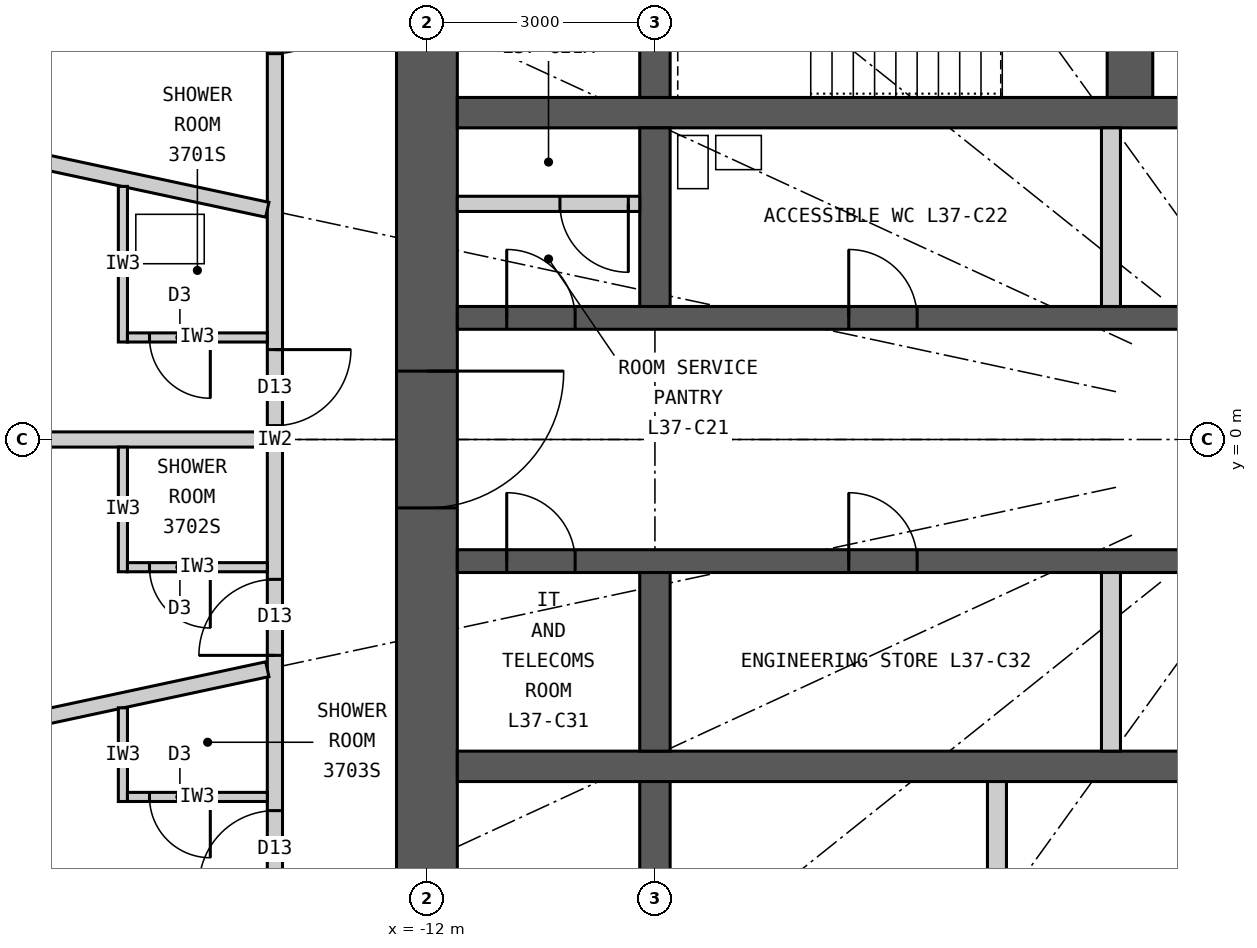
"""IFC4 building model, lengths in metres.
Left out: names, types, materials, properties, quantities, classifications, styles, units other than length and angle.
Written with IfcOpenShell. Run it as: python <this file> out.ifc"""

import sys

from ifc_helpers import new_model, si_unit, direction, frame, frame_2d, origin, place, context, subcontext, project, spatial, rectangle, extrude, element, fill, save


model = new_model("IFC4")
c1 = context("Model", 3, precision=1e-05, world=origin(), true_north=direction((0.0, 1.0)))
c2 = subcontext(c1, "Body", "Model", "MODEL_VIEW")
j1 = project(units=[si_unit("LENGTHUNIT", "METRE"), si_unit("PLANEANGLEUNIT", "RADIAN")], contexts=[c1])
p1 = place(None, origin())
s1 = spatial("IfcSite", under=j1, at=p1, CompositionType="ELEMENT")
p2 = place(p1, origin())
s2 = spatial("IfcBuilding", under=s1, at=p2, CompositionType="ELEMENT")
p3 = place(p2, frame((0.0, 0.0, 143.4)))
s3 = spatial("IfcBuildingStorey", under=s2, at=p3, CompositionType="ELEMENT", Elevation=143.4)
p4 = place(p3, frame((-12.0, 7.6, 0.0), z_axis=(0.0, 0.0, 1.0), x_axis=(0.0, -1.0, 0.0)))
e1 = element("IfcWall", 1, at=p4, inside=s3, PredefinedType="SHEAR", context=c2, shape_type="SweptSolid", body=[
    extrude(rectangle(XDim=15.2, YDim=0.8, at=frame_2d((7.6, 0.0))), origin(), (0.0, 0.0, 1.0), 3.3),
])
p5 = place(p4, frame((6.7, 0.0, 0.0)))
e2 = element("IfcOpeningElement", 2, at=p5, cuts=e1, PredefinedType="OPENING", context=c2, shape_type="SweptSolid", body=[
    extrude(rectangle(XDim=1.8, YDim=2.2, at=frame_2d((0.9, 1.1))), frame((0.0, 0.41, 0.0), z_axis=(0.0, -1.0, 0.0), x_axis=(1.0, 0.0, 0.0)), (0.0, 0.0, 1.0), 0.82),
])
p6 = place(p3, frame((-11.6, 4.3, 0.0), z_axis=(0.0, 0.0, 1.0), x_axis=(1.0, 0.0, 0.0)))
e3 = element("IfcWall", 3, at=p6, inside=s3, PredefinedType="SHEAR", context=c2, shape_type="SweptSolid", body=[
    extrude(rectangle(XDim=23.2, YDim=0.4, at=frame_2d((11.6, 0.0))), origin(), (0.0, 0.0, 1.0), 3.3),
])
p7 = place(p3, frame((-11.6, 1.6, 0.0), z_axis=(0.0, 0.0, 1.0), x_axis=(1.0, 0.0, 0.0)))
e4 = element("IfcWall", 4, at=p7, inside=s3, PredefinedType="SHEAR", context=c2, shape_type="SweptSolid", body=[
    extrude(rectangle(XDim=23.2, YDim=0.3, at=frame_2d((11.6, 0.0))), origin(), (0.0, 0.0, 1.0), 3.3),
])
p8 = place(p7, frame((9.55, 0.0, 0.0)))
e5 = element("IfcOpeningElement", 5, at=p8, cuts=e4, PredefinedType="OPENING", context=c2, shape_type="SweptSolid", body=[
    extrude(rectangle(XDim=1.1, YDim=2.2, at=frame_2d((0.55, 1.1))), frame((0.0, 0.16, 0.0), z_axis=(0.0, -1.0, 0.0), x_axis=(1.0, 0.0, 0.0)), (0.0, 0.0, 1.0), 0.32),
])
p9 = place(p7, frame((12.55, 0.0, 0.0)))
e6 = element("IfcOpeningElement", 6, at=p9, cuts=e4, PredefinedType="OPENING", context=c2, shape_type="SweptSolid", body=[
    extrude(rectangle(XDim=1.1, YDim=2.2, at=frame_2d((0.55, 1.1))), frame((0.0, 0.16, 0.0), z_axis=(0.0, -1.0, 0.0), x_axis=(1.0, 0.0, 0.0)), (0.0, 0.0, 1.0), 0.32),
])
p10 = place(p7, frame((0.65, 0.0, 0.0)))
e7 = element("IfcOpeningElement", 7, at=p10, cuts=e4, PredefinedType="OPENING", context=c2, shape_type="SweptSolid", body=[
    extrude(rectangle(XDim=0.9, YDim=2.2, at=frame_2d((0.45, 1.1))), frame((0.0, 0.16, 0.0), z_axis=(0.0, -1.0, 0.0), x_axis=(1.0, 0.0, 0.0)), (0.0, 0.0, 1.0), 0.32),
])
p11 = place(p7, frame((5.15, 0.0, 0.0)))
e8 = element("IfcOpeningElement", 8, at=p11, cuts=e4, PredefinedType="OPENING", context=c2, shape_type="SweptSolid", body=[
    extrude(rectangle(XDim=0.9, YDim=2.2, at=frame_2d((0.45, 1.1))), frame((0.0, 0.16, 0.0), z_axis=(0.0, -1.0, 0.0), x_axis=(1.0, 0.0, 0.0)), (0.0, 0.0, 1.0), 0.32),
])
p12 = place(p7, frame((21.65, 0.0, 0.0)))
e9 = element("IfcOpeningElement", 9, at=p12, cuts=e4, PredefinedType="OPENING", context=c2, shape_type="SweptSolid", body=[
    extrude(rectangle(XDim=0.9, YDim=2.2, at=frame_2d((0.45, 1.1))), frame((0.0, 0.16, 0.0), z_axis=(0.0, -1.0, 0.0), x_axis=(1.0, 0.0, 0.0)), (0.0, 0.0, 1.0), 0.32),
])
p13 = place(p3, frame((-11.6, -4.3, 0.0), z_axis=(0.0, 0.0, 1.0), x_axis=(1.0, 0.0, 0.0)))
e10 = element("IfcWall", 10, at=p13, inside=s3, PredefinedType="SHEAR", context=c2, shape_type="SweptSolid", body=[
    extrude(rectangle(XDim=23.2, YDim=0.4, at=frame_2d((11.6, 0.0))), origin(), (0.0, 0.0, 1.0), 3.3),
])
p14 = place(p3, frame((-11.6, -1.6, 0.0), z_axis=(0.0, 0.0, 1.0), x_axis=(1.0, 0.0, 0.0)))
e11 = element("IfcWall", 11, at=p14, inside=s3, PredefinedType="SHEAR", context=c2, shape_type="SweptSolid", body=[
    extrude(rectangle(XDim=23.2, YDim=0.3, at=frame_2d((11.6, 0.0))), origin(), (0.0, 0.0, 1.0), 3.3),
])
p15 = place(p14, frame((9.55, 0.0, 0.0)))
e12 = element("IfcOpeningElement", 12, at=p15, cuts=e11, PredefinedType="OPENING", context=c2, shape_type="SweptSolid", body=[
    extrude(rectangle(XDim=1.1, YDim=2.2, at=frame_2d((0.55, 1.1))), frame((0.0, 0.16, 0.0), z_axis=(0.0, -1.0, 0.0), x_axis=(1.0, 0.0, 0.0)), (0.0, 0.0, 1.0), 0.32),
])
p16 = place(p14, frame((15.3, 0.0, 0.0)))
e13 = element("IfcOpeningElement", 13, at=p16, cuts=e11, PredefinedType="OPENING", context=c2, shape_type="SweptSolid", body=[
    extrude(rectangle(XDim=1.6, YDim=2.4, at=frame_2d((0.8, 1.2))), frame((0.0, 0.16, 0.0), z_axis=(0.0, -1.0, 0.0), x_axis=(1.0, 0.0, 0.0)), (0.0, 0.0, 1.0), 0.32),
])
p17 = place(p14, frame((0.65, 0.0, 0.0)))
e14 = element("IfcOpeningElement", 14, at=p17, cuts=e11, PredefinedType="OPENING", context=c2, shape_type="SweptSolid", body=[
    extrude(rectangle(XDim=0.9, YDim=2.2, at=frame_2d((0.45, 1.1))), frame((0.0, 0.16, 0.0), z_axis=(0.0, -1.0, 0.0), x_axis=(1.0, 0.0, 0.0)), (0.0, 0.0, 1.0), 0.32),
])
p18 = place(p14, frame((5.15, 0.0, 0.0)))
e15 = element("IfcOpeningElement", 15, at=p18, cuts=e11, PredefinedType="OPENING", context=c2, shape_type="SweptSolid", body=[
    extrude(rectangle(XDim=0.9, YDim=2.2, at=frame_2d((0.45, 1.1))), frame((0.0, 0.16, 0.0), z_axis=(0.0, -1.0, 0.0), x_axis=(1.0, 0.0, 0.0)), (0.0, 0.0, 1.0), 0.32),
])
p19 = place(p14, frame((21.65, 0.0, 0.0)))
e16 = element("IfcOpeningElement", 16, at=p19, cuts=e11, PredefinedType="OPENING", context=c2, shape_type="SweptSolid", body=[
    extrude(rectangle(XDim=0.9, YDim=2.2, at=frame_2d((0.45, 1.1))), frame((0.0, 0.16, 0.0), z_axis=(0.0, -1.0, 0.0), x_axis=(1.0, 0.0, 0.0)), (0.0, 0.0, 1.0), 0.32),
])
p20 = place(p3, frame((-9.0, 4.5, 0.0), z_axis=(0.0, 0.0, 1.0), x_axis=(0.0, 1.0, 0.0)))
e17 = element("IfcWall", 17, at=p20, inside=s3, PredefinedType="SHEAR", context=c2, shape_type="SweptSolid", body=[
    extrude(rectangle(XDim=3.1, YDim=0.4, at=frame_2d((1.55, 0.0))), origin(), (0.0, 0.0, 1.0), 3.3),
])
for number, where, z_axis, x_axis in (
    (18, (-9.0, 1.75, 0.0), (0.0, 0.0, 1.0), (0.0, 1.0, 0.0)),
    (19, (-9.0, -4.1, 0.0), (0.0, 0.0, 1.0), (0.0, 1.0, 0.0)),
):
    element("IfcWall", number, at=place(p3, frame(where, z_axis=z_axis, x_axis=x_axis)), inside=s3, PredefinedType="SHEAR", context=c2, shape_type="SweptSolid", body=[
        extrude(rectangle(XDim=2.35, YDim=0.4, at=frame_2d((1.175, 0.0))), origin(), (0.0, 0.0, 1.0), 3.3),
    ])
p21 = place(p3, frame((-9.0, -7.6, 0.0), z_axis=(0.0, 0.0, 1.0), x_axis=(0.0, 1.0, 0.0)))
e20 = element("IfcWall", 20, at=p21, inside=s3, PredefinedType="SHEAR", context=c2, shape_type="SweptSolid", body=[
    extrude(rectangle(XDim=3.1, YDim=0.4, at=frame_2d((1.55, 0.0))), origin(), (0.0, 0.0, 1.0), 3.3),
])
p22 = place(p3, frame((-2.75, 4.5, 0.0), z_axis=(0.0, 0.0, 1.0), x_axis=(0.0, 1.0, 0.0)))
e21 = element("IfcWall", 21, at=p22, inside=s3, PredefinedType="SHEAR", context=c2, shape_type="SweptSolid", body=[
    extrude(rectangle(XDim=3.1, YDim=0.6, at=frame_2d((1.55, 0.0))), origin(), (0.0, 0.0, 1.0), 3.3),
])
p23 = place(p22, frame((0.925, 0.0, 0.0)))
e22 = element("IfcOpeningElement", 22, at=p23, cuts=e21, PredefinedType="OPENING", context=c2, shape_type="SweptSolid", body=[
    extrude(rectangle(XDim=1.1, YDim=2.2, at=frame_2d((0.55, 1.1))), frame((0.0, 0.31, 0.0), z_axis=(0.0, -1.0, 0.0), x_axis=(1.0, 0.0, 0.0)), (0.0, 0.0, 1.0), 0.62),
])
p24 = place(p3, frame((-4.5, -7.6, 0.0), z_axis=(0.0, 0.0, 1.0), x_axis=(0.0, 1.0, 0.0)))
e23 = element("IfcWall", 23, at=p24, inside=s3, PredefinedType="PARTITIONING", context=c2, shape_type="SweptSolid", body=[
    extrude(rectangle(XDim=3.1, YDim=0.25, at=frame_2d((1.55, 0.0))), origin(), (0.0, 0.0, 1.0), 3.3),
])
for number, where, z_axis, x_axis in (
    (24, (-3.0, 1.75, 0.0), (0.0, 0.0, 1.0), (0.0, 1.0, 0.0)),
    (25, (-3.0, -4.1, 0.0), (0.0, 0.0, 1.0), (0.0, 1.0, 0.0)),
):
    element("IfcWall", number, at=place(p3, frame(where, z_axis=z_axis, x_axis=x_axis)), inside=s3, PredefinedType="PARTITIONING", context=c2, shape_type="SweptSolid", body=[
        extrude(rectangle(XDim=2.35, YDim=0.25, at=frame_2d((1.175, 0.0))), origin(), (0.0, 0.0, 1.0), 3.3),
    ])
p25 = place(p3, frame((-14.0, 9.9, 0.0), z_axis=(0.0, 0.0, 1.0), x_axis=(0.0, -1.0, 0.0)))
e26 = element("IfcWall", 26, at=p25, inside=s3, PredefinedType="PARTITIONING", context=c2, shape_type="SweptSolid", body=[
    extrude(rectangle(XDim=19.8, YDim=0.2, at=frame_2d((9.9, 0.0))), origin(), (0.0, 0.0, 1.0), 3.12),
])
p26 = place(p25, frame((8.718, 0.0, 0.0)))
e27 = element("IfcOpeningElement", 27, at=p26, cuts=e26, PredefinedType="OPENING", context=c2, shape_type="SweptSolid", body=[
    extrude(rectangle(XDim=1.0, YDim=2.2, at=frame_2d((0.5, 1.1))), frame((0.0, 0.11, 0.0), z_axis=(0.0, -1.0, 0.0), x_axis=(1.0, 0.0, 0.0)), (0.0, 0.0, 1.0), 0.22),
])
p27 = place(p25, frame((11.74, 0.0, 0.0)))
e28 = element("IfcOpeningElement", 28, at=p27, cuts=e26, PredefinedType="OPENING", context=c2, shape_type="SweptSolid", body=[
    extrude(rectangle(XDim=1.0, YDim=2.2, at=frame_2d((0.5, 1.1))), frame((0.0, 0.11, 0.0), z_axis=(0.0, -1.0, 0.0), x_axis=(1.0, 0.0, 0.0)), (0.0, 0.0, 1.0), 0.22),
])
p28 = place(p25, frame((14.782, 0.0, 0.0)))
e29 = element("IfcOpeningElement", 29, at=p28, cuts=e26, PredefinedType="OPENING", context=c2, shape_type="SweptSolid", body=[
    extrude(rectangle(XDim=1.0, YDim=2.2, at=frame_2d((0.5, 1.1))), frame((0.0, 0.11, 0.0), z_axis=(0.0, -1.0, 0.0), x_axis=(1.0, 0.0, 0.0)), (0.0, 0.0, 1.0), 0.22),
])
p29 = place(p25, frame((17.707, 0.0, 0.0)))
e30 = element("IfcOpeningElement", 30, at=p29, cuts=e26, PredefinedType="OPENING", context=c2, shape_type="SweptSolid", body=[
    extrude(rectangle(XDim=1.0, YDim=2.2, at=frame_2d((0.5, 1.1))), frame((0.0, 0.11, 0.0), z_axis=(0.0, -1.0, 0.0), x_axis=(1.0, 0.0, 0.0)), (0.0, 0.0, 1.0), 0.22),
])
p30 = place(p25, frame((3.824, 0.0, 0.0)))
e31 = element("IfcOpeningElement", 31, at=p30, cuts=e26, PredefinedType="OPENING", context=c2, shape_type="SweptSolid", body=[
    extrude(rectangle(XDim=1.0, YDim=2.2, at=frame_2d((0.5, 1.1))), frame((0.0, 0.11, 0.0), z_axis=(0.0, -1.0, 0.0), x_axis=(1.0, 0.0, 0.0)), (0.0, 0.0, 1.0), 0.22),
])
p31 = place(p3, frame((-14.1, 3.022, 0.0), z_axis=(0.0, 0.0, 1.0), x_axis=(-0.977790639684, 0.209584028367, 0.0)))
e32 = element("IfcWall", 32, at=p31, inside=s3, PredefinedType="PARTITIONING", context=c2, shape_type="SweptSolid", body=[
    extrude(rectangle(XDim=6.98, YDim=0.2, at=frame_2d((3.49, 0.0))), origin(), (0.0, 0.0, 1.0), 2.27),
])
p32 = place(p3, frame((-14.1, 0.0, 0.0), z_axis=(0.0, 0.0, 1.0), x_axis=(-1.0, 0.0, 0.0)))
e33 = element("IfcWall", 33, at=p32, inside=s3, PredefinedType="PARTITIONING", context=c2, shape_type="SweptSolid", body=[
    extrude(rectangle(XDim=7.6, YDim=0.2, at=frame_2d((3.8, 0.0))), origin(), (0.0, 0.0, 1.0), 2.27),
])
p33 = place(p3, frame((-14.1, -3.022, 0.0), z_axis=(0.0, 0.0, 1.0), x_axis=(-0.977790639684, -0.209584028367, 0.0)))
e34 = element("IfcWall", 34, at=p33, inside=s3, PredefinedType="PARTITIONING", context=c2, shape_type="SweptSolid", body=[
    extrude(rectangle(XDim=6.98, YDim=0.2, at=frame_2d((3.49, 0.0))), origin(), (0.0, 0.0, 1.0), 2.27),
])
p34 = place(p3, frame((-16.0, 3.33, 0.0), z_axis=(0.0, 0.0, 1.0), x_axis=(0.0, -1.0, 0.0)))
e35 = element("IfcWall", 35, at=p34, inside=s3, PredefinedType="PARTITIONING", context=c2, shape_type="SweptSolid", body=[
    extrude(rectangle(XDim=2.047, YDim=0.12, at=frame_2d((1.024, 0.0))), origin(), (0.0, 0.0, 1.0), 3.12),
])
p35 = place(p3, frame((-14.1, 1.343, 0.0), z_axis=(0.0, 0.0, 1.0), x_axis=(-1.0, 0.0, 0.0)))
e36 = element("IfcWall", 36, at=p35, inside=s3, PredefinedType="PARTITIONING", context=c2, shape_type="SweptSolid", body=[
    extrude(rectangle(XDim=1.84, YDim=0.12, at=frame_2d((0.92, 0.0))), origin(), (0.0, 0.0, 1.0), 3.12),
])
p36 = place(p35, frame((0.75, 0.0, 0.0)))
e37 = element("IfcOpeningElement", 37, at=p36, cuts=e36, PredefinedType="OPENING", context=c2, shape_type="SweptSolid", body=[
    extrude(rectangle(XDim=0.8, YDim=2.1, at=frame_2d((0.4, 1.05))), frame((0.0, 0.07, 0.0), z_axis=(0.0, -1.0, 0.0), x_axis=(1.0, 0.0, 0.0)), (0.0, 0.0, 1.0), 0.14),
])
p37 = place(p3, frame((-16.0, -0.1, 0.0), z_axis=(0.0, 0.0, 1.0), x_axis=(0.0, -1.0, 0.0)))
e38 = element("IfcWall", 38, at=p37, inside=s3, PredefinedType="PARTITIONING", context=c2, shape_type="SweptSolid", body=[
    extrude(rectangle(XDim=1.64, YDim=0.12, at=frame_2d((0.82, 0.0))), origin(), (0.0, 0.0, 1.0), 3.12),
])
p38 = place(p3, frame((-14.1, -1.68, 0.0), z_axis=(0.0, 0.0, 1.0), x_axis=(-1.0, 0.0, 0.0)))
e39 = element("IfcWall", 39, at=p38, inside=s3, PredefinedType="PARTITIONING", context=c2, shape_type="SweptSolid", body=[
    extrude(rectangle(XDim=1.84, YDim=0.12, at=frame_2d((0.92, 0.0))), origin(), (0.0, 0.0, 1.0), 3.12),
])
p39 = place(p38, frame((0.75, 0.0, 0.0)))
e40 = element("IfcOpeningElement", 40, at=p39, cuts=e39, PredefinedType="OPENING", context=c2, shape_type="SweptSolid", body=[
    extrude(rectangle(XDim=0.8, YDim=2.1, at=frame_2d((0.4, 1.05))), frame((0.0, 0.07, 0.0), z_axis=(0.0, -1.0, 0.0), x_axis=(1.0, 0.0, 0.0)), (0.0, 0.0, 1.0), 0.14),
])
p40 = place(p3, frame((-16.0, -3.53, 0.0), z_axis=(0.0, 0.0, 1.0), x_axis=(0.0, -1.0, 0.0)))
e41 = element("IfcWall", 41, at=p40, inside=s3, PredefinedType="PARTITIONING", context=c2, shape_type="SweptSolid", body=[
    extrude(rectangle(XDim=1.233, YDim=0.12, at=frame_2d((0.616, 0.0))), origin(), (0.0, 0.0, 1.0), 3.12),
])
p41 = place(p3, frame((-14.1, -4.702, 0.0), z_axis=(0.0, 0.0, 1.0), x_axis=(-1.0, 0.0, 0.0)))
e42 = element("IfcWall", 42, at=p41, inside=s3, PredefinedType="PARTITIONING", context=c2, shape_type="SweptSolid", body=[
    extrude(rectangle(XDim=1.84, YDim=0.12, at=frame_2d((0.92, 0.0))), origin(), (0.0, 0.0, 1.0), 3.12),
])
p42 = place(p41, frame((0.75, 0.0, 0.0)))
e43 = element("IfcOpeningElement", 43, at=p42, cuts=e42, PredefinedType="OPENING", context=c2, shape_type="SweptSolid", body=[
    extrude(rectangle(XDim=0.8, YDim=2.1, at=frame_2d((0.4, 1.05))), frame((0.0, 0.07, 0.0), z_axis=(0.0, -1.0, 0.0), x_axis=(1.0, 0.0, 0.0)), (0.0, 0.0, 1.0), 0.14),
])
p43 = place(p3, frame((-11.6, 3.1, 0.0), z_axis=(0.0, 0.0, 1.0), x_axis=(1.0, 0.0, 0.0)))
e44 = element("IfcWall", 44, at=p43, inside=s3, PredefinedType="PARTITIONING", context=c2, shape_type="SweptSolid", body=[
    extrude(rectangle(XDim=2.4, YDim=0.2, at=frame_2d((1.2, 0.0))), origin(), (0.0, 0.0, 1.0), 3.12),
])
p44 = place(p43, frame((1.35, 0.0, 0.0)))
e45 = element("IfcOpeningElement", 45, at=p44, cuts=e44, PredefinedType="OPENING", context=c2, shape_type="SweptSolid", body=[
    extrude(rectangle(XDim=0.9, YDim=2.2, at=frame_2d((0.45, 1.1))), frame((0.0, 0.11, 0.0), z_axis=(0.0, -1.0, 0.0), x_axis=(1.0, 0.0, 0.0)), (0.0, 0.0, 1.0), 0.22),
])
p45 = place(p36, origin())
e46 = element("IfcDoor", 46, at=p45, inside=s3, OperationType="SINGLE_SWING_LEFT", PredefinedType="DOOR", context=c2, shape_type="SweptSolid", body=[
    extrude(rectangle(XDim=0.8, YDim=2.1, at=frame_2d((0.4, 1.05))), frame((0.0, 0.025, 0.0), z_axis=(0.0, -1.0, 0.0), x_axis=(1.0, 0.0, 0.0)), (0.0, 0.0, 1.0), 0.05),
])
fill(e37, e46)
p46 = place(p26, origin())
e47 = element("IfcDoor", 47, at=p46, inside=s3, OperationType="SINGLE_SWING_LEFT", PredefinedType="DOOR", context=c2, shape_type="SweptSolid", body=[
    extrude(rectangle(XDim=1.0, YDim=2.2, at=frame_2d((0.5, 1.1))), frame((0.0, 0.025, 0.0), z_axis=(0.0, -1.0, 0.0), x_axis=(1.0, 0.0, 0.0)), (0.0, 0.0, 1.0), 0.05),
])
fill(e27, e47)
p47 = place(p39, origin())
e48 = element("IfcDoor", 48, at=p47, inside=s3, OperationType="SINGLE_SWING_LEFT", PredefinedType="DOOR", context=c2, shape_type="SweptSolid", body=[
    extrude(rectangle(XDim=0.8, YDim=2.1, at=frame_2d((0.4, 1.05))), frame((0.0, 0.025, 0.0), z_axis=(0.0, -1.0, 0.0), x_axis=(1.0, 0.0, 0.0)), (0.0, 0.0, 1.0), 0.05),
])
fill(e40, e48)
p48 = place(p27, origin())
e49 = element("IfcDoor", 49, at=p48, inside=s3, OperationType="SINGLE_SWING_RIGHT", PredefinedType="DOOR", context=c2, shape_type="SweptSolid", body=[
    extrude(rectangle(XDim=1.0, YDim=2.2, at=frame_2d((0.5, 1.1))), frame((0.0, 0.025, 0.0), z_axis=(0.0, -1.0, 0.0), x_axis=(1.0, 0.0, 0.0)), (0.0, 0.0, 1.0), 0.05),
])
fill(e28, e49)
p49 = place(p42, origin())
e50 = element("IfcDoor", 50, at=p49, inside=s3, OperationType="SINGLE_SWING_LEFT", PredefinedType="DOOR", context=c2, shape_type="SweptSolid", body=[
    extrude(rectangle(XDim=0.8, YDim=2.1, at=frame_2d((0.4, 1.05))), frame((0.0, 0.025, 0.0), z_axis=(0.0, -1.0, 0.0), x_axis=(1.0, 0.0, 0.0)), (0.0, 0.0, 1.0), 0.05),
])
fill(e43, e50)
p50 = place(p28, origin())
e51 = element("IfcDoor", 51, at=p50, inside=s3, OperationType="SINGLE_SWING_RIGHT", PredefinedType="DOOR", context=c2, shape_type="SweptSolid", body=[
    extrude(rectangle(XDim=1.0, YDim=2.2, at=frame_2d((0.5, 1.1))), frame((0.0, 0.025, 0.0), z_axis=(0.0, -1.0, 0.0), x_axis=(1.0, 0.0, 0.0)), (0.0, 0.0, 1.0), 0.05),
])
fill(e29, e51)
p51 = place(p30, origin())
e52 = element("IfcDoor", 52, at=p51, inside=s3, OperationType="SINGLE_SWING_LEFT", PredefinedType="DOOR", context=c2, shape_type="SweptSolid", body=[
    extrude(rectangle(XDim=1.0, YDim=2.2, at=frame_2d((0.5, 1.1))), frame((0.0, 0.025, 0.0), z_axis=(0.0, -1.0, 0.0), x_axis=(1.0, 0.0, 0.0)), (0.0, 0.0, 1.0), 0.05),
])
fill(e31, e52)
p52 = place(p44, origin())
e53 = element("IfcDoor", 53, at=p52, inside=s3, OperationType="SINGLE_SWING_RIGHT", PredefinedType="DOOR", context=c2, shape_type="SweptSolid", body=[
    extrude(rectangle(XDim=0.9, YDim=2.2, at=frame_2d((0.45, 1.1))), frame((0.0, 0.025, 0.0), z_axis=(0.0, -1.0, 0.0), x_axis=(1.0, 0.0, 0.0)), (0.0, 0.0, 1.0), 0.05),
])
fill(e45, e53)
p53 = place(p10, origin())
e54 = element("IfcDoor", 54, at=p53, inside=s3, OperationType="SINGLE_SWING_LEFT", PredefinedType="DOOR", context=c2, shape_type="SweptSolid", body=[
    extrude(rectangle(XDim=0.9, YDim=2.2, at=frame_2d((0.45, 1.1))), frame((0.0, 0.025, 0.0), z_axis=(0.0, -1.0, 0.0), x_axis=(1.0, 0.0, 0.0)), (0.0, 0.0, 1.0), 0.05),
])
fill(e7, e54)
p54 = place(p11, origin())
e55 = element("IfcDoor", 55, at=p54, inside=s3, OperationType="SINGLE_SWING_LEFT", PredefinedType="DOOR", context=c2, shape_type="SweptSolid", body=[
    extrude(rectangle(XDim=0.9, YDim=2.2, at=frame_2d((0.45, 1.1))), frame((0.0, 0.025, 0.0), z_axis=(0.0, -1.0, 0.0), x_axis=(1.0, 0.0, 0.0)), (0.0, 0.0, 1.0), 0.05),
])
fill(e8, e55)
p55 = place(p17, origin())
e56 = element("IfcDoor", 56, at=p55, inside=s3, OperationType="SINGLE_SWING_LEFT", PredefinedType="DOOR", context=c2, shape_type="SweptSolid", body=[
    extrude(rectangle(XDim=0.9, YDim=2.2, at=frame_2d((0.45, 1.1))), frame((0.0, 0.025, 0.0), z_axis=(0.0, -1.0, 0.0), x_axis=(1.0, 0.0, 0.0)), (0.0, 0.0, 1.0), 0.05),
])
fill(e14, e56)
p56 = place(p18, origin())
e57 = element("IfcDoor", 57, at=p56, inside=s3, OperationType="SINGLE_SWING_LEFT", PredefinedType="DOOR", context=c2, shape_type="SweptSolid", body=[
    extrude(rectangle(XDim=0.9, YDim=2.2, at=frame_2d((0.45, 1.1))), frame((0.0, 0.025, 0.0), z_axis=(0.0, -1.0, 0.0), x_axis=(1.0, 0.0, 0.0)), (0.0, 0.0, 1.0), 0.05),
])
fill(e15, e57)
p57 = place(p5, origin())
e58 = element("IfcDoor", 58, at=p57, inside=s3, OperationType="DOUBLE_DOOR_DOUBLE_SWING", PredefinedType="DOOR", context=c2, shape_type="SweptSolid", body=[
    extrude(rectangle(XDim=1.8, YDim=2.2, at=frame_2d((0.9, 1.1))), frame((0.0, 0.025, 0.0), z_axis=(0.0, -1.0, 0.0), x_axis=(1.0, 0.0, 0.0)), (0.0, 0.0, 1.0), 0.05),
])
fill(e2, e58)
save(model, sys.argv[1])
